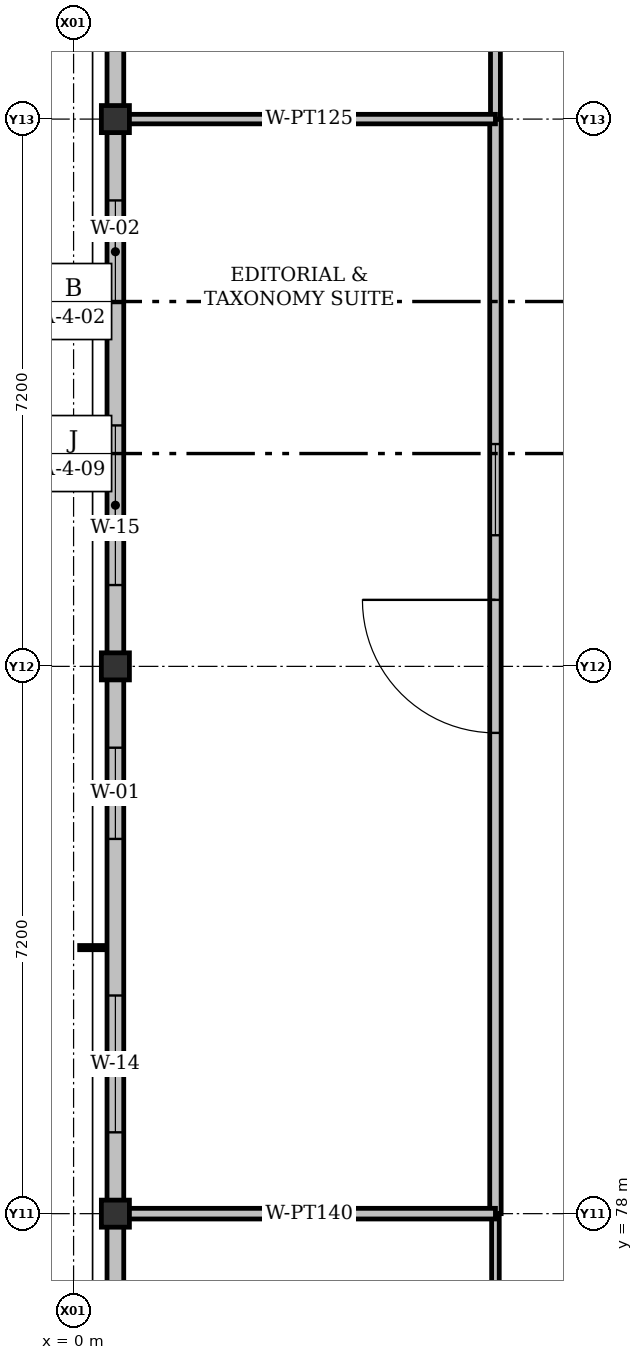
"""IFC4 building model, lengths in metres.
Left out: names, types, materials, properties, quantities, classifications, styles, units other than length and angle.
Written with IfcOpenShell. Run it as: python <this file> out.ifc"""

import sys

from ifc_helpers import new_model, si_unit, direction, frame, frame_2d, origin, origin_2d, place, context, subcontext, project, spatial, rectangle, i_section, extrude, element, fill, save


model = new_model("IFC4")
c1 = context("Model", 3, precision=1e-05, world=origin(), true_north=direction((0.0, 1.0)))
c2 = subcontext(c1, "Body", "Model", "MODEL_VIEW")
j1 = project(units=[si_unit("LENGTHUNIT", "METRE"), si_unit("PLANEANGLEUNIT", "RADIAN")], contexts=[c1])
p1 = place(None, origin())
s1 = spatial("IfcSite", under=j1, at=p1, CompositionType="ELEMENT")
p2 = place(p1, origin())
s2 = spatial("IfcBuilding", under=s1, at=p2, CompositionType="ELEMENT")
p3 = place(p2, frame((0.0, 0.0, 51.9)))
s3 = spatial("IfcBuildingStorey", under=s2, at=p3, CompositionType="ELEMENT", Elevation=51.9)
for number, where, z_axis, x_axis in (
    (1, (0.55, 78.0, 0.0), (0.0, 0.0, 1.0), (1.0, 0.0, 0.0)),
    (2, (0.55, 85.2, 0.0), (0.0, 0.0, 1.0), (1.0, 0.0, 0.0)),
    (3, (0.55, 92.4, 0.0), (0.0, 0.0, 1.0), (1.0, 0.0, 0.0)),
):
    element("IfcColumn", number, at=place(p3, frame(where, z_axis=z_axis, x_axis=x_axis)), inside=s3, PredefinedType="COLUMN", context=c2, shape_type="SweptSolid", body=[
        extrude(i_section(OverallWidth=0.369, OverallDepth=0.356, WebThickness=0.011, FlangeThickness=0.018, FilletRadius=0.015, at=origin_2d()), origin(), (0.0, 0.0, 1.0), 4.2),
    ])
p4 = place(p3, frame((0.55, 70.5, 0.0), z_axis=(0.0, 0.0, 1.0), x_axis=(0.0, 1.0, 0.0)))
e4 = element("IfcWall", 4, at=p4, inside=s3, PredefinedType="SOLIDWALL", context=c2, shape_type="SweptSolid", body=[
    extrude(rectangle(XDim=7.5, YDim=0.22, at=frame_2d((3.75, 0.0))), origin(), (0.0, 0.0, 1.0), 3.577),
])
p5 = place(p4, frame((1.07, 0.0, 0.92)))
e5 = element("IfcOpeningElement", 5, at=p5, cuts=e4, PredefinedType="OPENING", context=c2, shape_type="SweptSolid", body=[
    extrude(rectangle(XDim=1.5, YDim=1.7, at=frame_2d((0.75, 0.85))), frame((0.0, 0.11, 0.0), z_axis=(0.0, -1.0, 0.0), x_axis=(1.0, 0.0, 0.0)), (0.0, 0.0, 1.0), 0.22),
])
p6 = place(p4, frame((4.43, 0.0, 0.92)))
e6 = element("IfcOpeningElement", 6, at=p6, cuts=e4, PredefinedType="OPENING", context=c2, shape_type="SweptSolid", body=[
    extrude(rectangle(XDim=2.0, YDim=1.35, at=frame_2d((1.0, 0.675))), frame((0.0, 0.11, 0.0), z_axis=(0.0, -1.0, 0.0), x_axis=(1.0, 0.0, 0.0)), (0.0, 0.0, 1.0), 0.22),
])
p7 = place(p3, frame((0.55, 78.0, 0.0), z_axis=(0.0, 0.0, 1.0), x_axis=(0.0, 1.0, 0.0)))
e7 = element("IfcWall", 7, at=p7, inside=s3, PredefinedType="SOLIDWALL", context=c2, shape_type="SweptSolid", body=[
    extrude(rectangle(XDim=7.2, YDim=0.22, at=frame_2d((3.6, 0.0))), origin(), (0.0, 0.0, 1.0), 3.577),
])
p8 = place(p7, frame((1.07, 0.0, 0.92)))
e8 = element("IfcOpeningElement", 8, at=p8, cuts=e7, PredefinedType="OPENING", context=c2, shape_type="SweptSolid", body=[
    extrude(rectangle(XDim=1.8, YDim=1.7, at=frame_2d((0.9, 0.85))), frame((0.0, 0.11, 0.0), z_axis=(0.0, -1.0, 0.0), x_axis=(1.0, 0.0, 0.0)), (0.0, 0.0, 1.0), 0.22),
])
p9 = place(p7, frame((4.93, 0.0, 0.92)))
e9 = element("IfcOpeningElement", 9, at=p9, cuts=e7, PredefinedType="OPENING", context=c2, shape_type="SweptSolid", body=[
    extrude(rectangle(XDim=1.2, YDim=1.4, at=frame_2d((0.6, 0.7))), frame((0.0, 0.11, 0.0), z_axis=(0.0, -1.0, 0.0), x_axis=(1.0, 0.0, 0.0)), (0.0, 0.0, 1.0), 0.22),
])
p10 = place(p3, frame((0.55, 85.2, 0.0), z_axis=(0.0, 0.0, 1.0), x_axis=(0.0, 1.0, 0.0)))
e10 = element("IfcWall", 10, at=p10, inside=s3, PredefinedType="SOLIDWALL", context=c2, shape_type="SweptSolid", body=[
    extrude(rectangle(XDim=7.2, YDim=0.22, at=frame_2d((3.6, 0.0))), origin(), (0.0, 0.0, 1.0), 3.577),
])
p11 = place(p10, frame((1.07, 0.0, 0.92)))
e11 = element("IfcOpeningElement", 11, at=p11, cuts=e10, PredefinedType="OPENING", context=c2, shape_type="SweptSolid", body=[
    extrude(rectangle(XDim=2.1, YDim=1.7, at=frame_2d((1.05, 0.85))), frame((0.0, 0.11, 0.0), z_axis=(0.0, -1.0, 0.0), x_axis=(1.0, 0.0, 0.0)), (0.0, 0.0, 1.0), 0.22),
])
p12 = place(p10, frame((4.78, 0.0, 0.92)))
e12 = element("IfcOpeningElement", 12, at=p12, cuts=e10, PredefinedType="OPENING", context=c2, shape_type="SweptSolid", body=[
    extrude(rectangle(XDim=1.35, YDim=1.4, at=frame_2d((0.675, 0.7))), frame((0.0, 0.11, 0.0), z_axis=(0.0, -1.0, 0.0), x_axis=(1.0, 0.0, 0.0)), (0.0, 0.0, 1.0), 0.22),
])
p13 = place(p3, frame((0.55, 92.4, 0.0), z_axis=(0.0, 0.0, 1.0), x_axis=(0.0, 1.0, 0.0)))
e13 = element("IfcWall", 13, at=p13, inside=s3, PredefinedType="SOLIDWALL", context=c2, shape_type="SweptSolid", body=[
    extrude(rectangle(XDim=7.2, YDim=0.22, at=frame_2d((3.6, 0.0))), origin(), (0.0, 0.0, 1.0), 3.577),
])
p14 = place(p13, frame((1.07, 0.0, 0.92)))
e14 = element("IfcOpeningElement", 14, at=p14, cuts=e13, PredefinedType="OPENING", context=c2, shape_type="SweptSolid", body=[
    extrude(rectangle(XDim=2.4, YDim=1.7, at=frame_2d((1.2, 0.85))), frame((0.0, 0.11, 0.0), z_axis=(0.0, -1.0, 0.0), x_axis=(1.0, 0.0, 0.0)), (0.0, 0.0, 1.0), 0.22),
])
p15 = place(p13, frame((4.63, 0.0, 0.92)))
e15 = element("IfcOpeningElement", 15, at=p15, cuts=e13, PredefinedType="OPENING", context=c2, shape_type="SweptSolid", body=[
    extrude(rectangle(XDim=1.5, YDim=1.4, at=frame_2d((0.75, 0.7))), frame((0.0, 0.11, 0.0), z_axis=(0.0, -1.0, 0.0), x_axis=(1.0, 0.0, 0.0)), (0.0, 0.0, 1.0), 0.22),
])
p16 = place(p3, frame((5.55, 70.625, 0.0), z_axis=(0.0, 0.0, 1.0), x_axis=(0.0, 1.0, 0.0)))
e16 = element("IfcWall", 16, at=p16, inside=s3, PredefinedType="PARTITIONING", context=c2, shape_type="SweptSolid", body=[
    extrude(rectangle(XDim=7.375, YDim=0.1, at=frame_2d((3.688, 0.0))), origin(), (0.0, 0.0, 1.0), 3.451),
])
p17 = place(p16, frame((2.8, 0.0, 0.0)))
e17 = element("IfcOpeningElement", 17, at=p17, cuts=e16, PredefinedType="OPENING", context=c2, shape_type="SweptSolid", body=[
    extrude(rectangle(XDim=1.65, YDim=2.3, at=frame_2d((0.825, 1.15))), frame((0.0, 0.05, 0.0), z_axis=(0.0, -1.0, 0.0), x_axis=(1.0, 0.0, 0.0)), (0.0, 0.0, 1.0), 0.1),
])
p18 = place(p3, frame((5.55, 78.0, 0.0), z_axis=(0.0, 0.0, 1.0), x_axis=(0.0, 1.0, 0.0)))
e18 = element("IfcWall", 18, at=p18, inside=s3, PredefinedType="PARTITIONING", context=c2, shape_type="SweptSolid", body=[
    extrude(rectangle(XDim=14.4, YDim=0.15, at=frame_2d((7.2, 0.0))), origin(), (0.0, 0.0, 1.0), 3.451),
])
p19 = place(p18, frame((6.325, 0.0, 0.0)))
e19 = element("IfcOpeningElement", 19, at=p19, cuts=e18, PredefinedType="OPENING", context=c2, shape_type="SweptSolid", body=[
    extrude(rectangle(XDim=1.75, YDim=2.35, at=frame_2d((0.875, 1.175))), frame((0.0, 0.075, 0.0), z_axis=(0.0, -1.0, 0.0), x_axis=(1.0, 0.0, 0.0)), (0.0, 0.0, 1.0), 0.15),
])
p20 = place(p18, frame((8.925, 0.0, 0.92)))
e20 = element("IfcOpeningElement", 20, at=p20, cuts=e18, PredefinedType="OPENING", context=c2, shape_type="SweptSolid", body=[
    extrude(rectangle(XDim=1.2, YDim=1.2, at=frame_2d((0.6, 0.6))), frame((0.0, 0.075, 0.0), z_axis=(0.0, -1.0, 0.0), x_axis=(1.0, 0.0, 0.0)), (0.0, 0.0, 1.0), 0.15),
])
p21 = place(p3, frame((0.65, 78.0, 0.0), z_axis=(0.0, 0.0, 1.0), x_axis=(1.0, 0.0, 0.0)))
e21 = element("IfcWall", 21, at=p21, inside=s3, PredefinedType="PARTITIONING", context=c2, shape_type="SweptSolid", body=[
    extrude(rectangle(XDim=4.9, YDim=0.14, at=frame_2d((2.45, 0.0))), origin(), (0.0, 0.0, 1.0), 3.451),
])
p22 = place(p3, frame((5.55, 92.4, 0.0), z_axis=(0.0, 0.0, 1.0), x_axis=(0.0, 1.0, 0.0)))
e22 = element("IfcWall", 22, at=p22, inside=s3, PredefinedType="PARTITIONING", context=c2, shape_type="SweptSolid", body=[
    extrude(rectangle(XDim=11.2, YDim=0.13, at=frame_2d((5.6, 0.0))), origin(), (0.0, 0.0, 1.0), 3.451),
])
p23 = place(p22, frame((4.675, 0.0, 0.0)))
e23 = element("IfcOpeningElement", 23, at=p23, cuts=e22, PredefinedType="OPENING", context=c2, shape_type="SweptSolid", body=[
    extrude(rectangle(XDim=1.85, YDim=2.35, at=frame_2d((0.925, 1.175))), frame((0.0, 0.065, 0.0), z_axis=(0.0, -1.0, 0.0), x_axis=(1.0, 0.0, 0.0)), (0.0, 0.0, 1.0), 0.13),
])
p24 = place(p22, frame((7.375, 0.0, 0.92)))
e24 = element("IfcOpeningElement", 24, at=p24, cuts=e22, PredefinedType="OPENING", context=c2, shape_type="SweptSolid", body=[
    extrude(rectangle(XDim=1.4, YDim=1.2, at=frame_2d((0.7, 0.6))), frame((0.0, 0.065, 0.0), z_axis=(0.0, -1.0, 0.0), x_axis=(1.0, 0.0, 0.0)), (0.0, 0.0, 1.0), 0.13),
])
p25 = place(p3, frame((0.65, 92.4, 0.0), z_axis=(0.0, 0.0, 1.0), x_axis=(1.0, 0.0, 0.0)))
e25 = element("IfcWall", 25, at=p25, inside=s3, PredefinedType="PARTITIONING", context=c2, shape_type="SweptSolid", body=[
    extrude(rectangle(XDim=4.9, YDim=0.125, at=frame_2d((2.45, 0.0))), origin(), (0.0, 0.0, 1.0), 3.451),
])
p26 = place(p8, origin())
e26 = element("IfcWindow", 26, at=p26, inside=s3, PartitioningType="DOUBLE_PANEL_VERTICAL", PredefinedType="WINDOW", context=c2, shape_type="SweptSolid", body=[
    extrude(rectangle(XDim=1.8, YDim=1.7, at=frame_2d((0.9, 0.85))), frame((0.0, 0.03, 0.0), z_axis=(0.0, -1.0, 0.0), x_axis=(1.0, 0.0, 0.0)), (0.0, 0.0, 1.0), 0.06),
])
fill(e8, e26)
p27 = place(p9, origin())
e27 = element("IfcWindow", 27, at=p27, inside=s3, PartitioningType="SINGLE_PANEL", PredefinedType="WINDOW", context=c2, shape_type="SweptSolid", body=[
    extrude(rectangle(XDim=1.2, YDim=1.4, at=frame_2d((0.6, 0.7))), frame((0.0, 0.03, 0.0), z_axis=(0.0, -1.0, 0.0), x_axis=(1.0, 0.0, 0.0)), (0.0, 0.0, 1.0), 0.06),
])
fill(e9, e27)
p28 = place(p11, origin())
e28 = element("IfcWindow", 28, at=p28, inside=s3, PartitioningType="DOUBLE_PANEL_VERTICAL", PredefinedType="WINDOW", context=c2, shape_type="SweptSolid", body=[
    extrude(rectangle(XDim=2.1, YDim=1.7, at=frame_2d((1.05, 0.85))), frame((0.0, 0.03, 0.0), z_axis=(0.0, -1.0, 0.0), x_axis=(1.0, 0.0, 0.0)), (0.0, 0.0, 1.0), 0.06),
])
fill(e11, e28)
p29 = place(p12, origin())
e29 = element("IfcWindow", 29, at=p29, inside=s3, PartitioningType="SINGLE_PANEL", PredefinedType="WINDOW", context=c2, shape_type="SweptSolid", body=[
    extrude(rectangle(XDim=1.35, YDim=1.4, at=frame_2d((0.675, 0.7))), frame((0.0, 0.03, 0.0), z_axis=(0.0, -1.0, 0.0), x_axis=(1.0, 0.0, 0.0)), (0.0, 0.0, 1.0), 0.06),
])
fill(e12, e29)
p30 = place(p19, origin())
e30 = element("IfcDoor", 30, at=p30, inside=s3, OperationType="SINGLE_SWING_RIGHT", PredefinedType="DOOR", context=c2, shape_type="SweptSolid", body=[
    extrude(rectangle(XDim=1.75, YDim=2.35, at=frame_2d((0.875, 1.175))), frame((0.0, 0.025, 0.0), z_axis=(0.0, -1.0, 0.0), x_axis=(1.0, 0.0, 0.0)), (0.0, 0.0, 1.0), 0.05),
])
fill(e19, e30)
p31 = place(p20, origin())
e31 = element("IfcWindow", 31, at=p31, inside=s3, PartitioningType="SINGLE_PANEL", PredefinedType="WINDOW", context=c2, shape_type="SweptSolid", body=[
    extrude(rectangle(XDim=1.2, YDim=1.2, at=frame_2d((0.6, 0.6))), frame((0.0, 0.03, 0.0), z_axis=(0.0, -1.0, 0.0), x_axis=(1.0, 0.0, 0.0)), (0.0, 0.0, 1.0), 0.06),
])
fill(e20, e31)
save(model, sys.argv[1])
